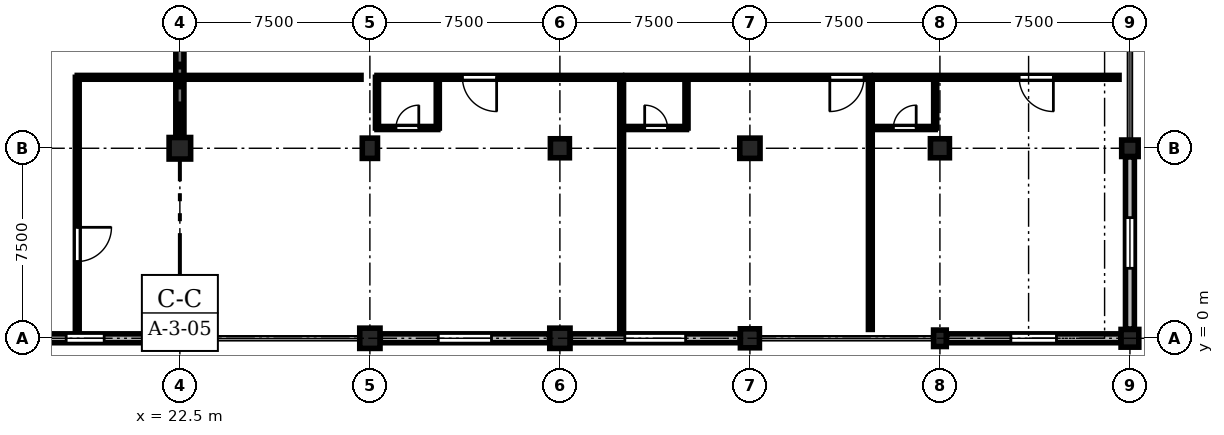
"""IFC4 building model, lengths in metres.
Left out: names, types, materials, properties, quantities, classifications, styles, units other than length and angle.
Written with IfcOpenShell. Run it as: python <this file> out.ifc"""

import sys

from ifc_helpers import new_model, si_unit, direction, frame, frame_2d, origin, origin_2d, place, context, subcontext, project, spatial, rectangle, circle, extrude, element, fill, save


model = new_model("IFC4")
c1 = context("Model", 3, precision=1e-05, world=origin(), true_north=direction((0.0, 1.0)))
c2 = subcontext(c1, "Body", "Model", "MODEL_VIEW")
j1 = project(units=[si_unit("LENGTHUNIT", "METRE"), si_unit("PLANEANGLEUNIT", "RADIAN")], contexts=[c1])
p1 = place(None, origin())
s1 = spatial("IfcSite", under=j1, at=p1, CompositionType="ELEMENT")
p2 = place(p1, origin())
s2 = spatial("IfcBuilding", under=s1, at=p2, CompositionType="ELEMENT")
p3 = place(p2, frame((0.0, 0.0, 4.8)))
s3 = spatial("IfcBuildingStorey", under=s2, at=p3, CompositionType="ELEMENT", Elevation=4.8)
p4 = place(p3, frame((22.5, 0.0, 0.0), z_axis=(0.0, 0.0, 1.0), x_axis=(1.0, 0.0, 0.0)))
e1 = element("IfcColumn", 1, at=p4, inside=s3, PredefinedType="COLUMN", context=c2, shape_type="SweptSolid", body=[
    extrude(circle(Radius=0.375, at=origin_2d()), origin(), (0.0, 0.0, 1.0), 4.5),
])
p5 = place(p3, frame((22.5, 7.5, 0.0), z_axis=(0.0, 0.0, 1.0), x_axis=(1.0, 0.0, 0.0)))
e2 = element("IfcColumn", 2, at=p5, inside=s3, PredefinedType="COLUMN", context=c2, shape_type="SweptSolid", body=[
    extrude(rectangle(XDim=0.85, YDim=0.85, at=origin_2d()), origin(), (0.0, 0.0, 1.0), 4.5),
])
p6 = place(p3, frame((30.0, 0.0, 0.0), z_axis=(0.0, 0.0, 1.0), x_axis=(1.0, 0.0, 0.0)))
e3 = element("IfcColumn", 3, at=p6, inside=s3, PredefinedType="COLUMN", context=c2, shape_type="SweptSolid", body=[
    extrude(rectangle(XDim=0.8, YDim=0.8, at=origin_2d()), origin(), (0.0, 0.0, 1.0), 4.5),
])
p7 = place(p3, frame((30.0, 7.5, 0.0), z_axis=(0.0, 0.0, 1.0), x_axis=(1.0, 0.0, 0.0)))
e4 = element("IfcColumn", 4, at=p7, inside=s3, PredefinedType="COLUMN", context=c2, shape_type="SweptSolid", body=[
    extrude(rectangle(XDim=0.6, YDim=0.8, at=origin_2d()), origin(), (0.0, 0.0, 1.0), 4.5),
])
p8 = place(p3, frame((37.5, 0.0, 0.0), z_axis=(0.0, 0.0, 1.0), x_axis=(1.0, 0.0, 0.0)))
e5 = element("IfcColumn", 5, at=p8, inside=s3, PredefinedType="COLUMN", context=c2, shape_type="SweptSolid", body=[
    extrude(rectangle(XDim=0.8, YDim=0.8, at=origin_2d()), origin(), (0.0, 0.0, 1.0), 4.5),
])
for number, where, z_axis, x_axis in (
    (6, (37.5, 7.5, 0.0), (0.0, 0.0, 1.0), (1.0, 0.0, 0.0)),
    (7, (45.0, 0.0, 0.0), (0.0, 0.0, 1.0), (1.0, 0.0, 0.0)),
):
    element("IfcColumn", number, at=place(p3, frame(where, z_axis=z_axis, x_axis=x_axis)), inside=s3, PredefinedType="COLUMN", context=c2, shape_type="SweptSolid", body=[
        extrude(circle(Radius=0.375, at=origin_2d()), origin(), (0.0, 0.0, 1.0), 4.5),
    ])
p9 = place(p3, frame((45.0, 7.5, 0.0), z_axis=(0.0, 0.0, 1.0), x_axis=(1.0, 0.0, 0.0)))
e8 = element("IfcColumn", 8, at=p9, inside=s3, PredefinedType="COLUMN", context=c2, shape_type="SweptSolid", body=[
    extrude(rectangle(XDim=0.8, YDim=0.8, at=origin_2d()), origin(), (0.0, 0.0, 1.0), 4.5),
])
p10 = place(p3, frame((52.5, 0.0, 0.0), z_axis=(0.0, 0.0, 1.0), x_axis=(1.0, 0.0, 0.0)))
e9 = element("IfcColumn", 9, at=p10, inside=s3, PredefinedType="COLUMN", context=c2, shape_type="SweptSolid", body=[
    extrude(rectangle(XDim=0.5, YDim=0.65, at=origin_2d()), origin(), (0.0, 0.0, 1.0), 4.5),
])
p11 = place(p3, frame((52.5, 7.5, 0.0), z_axis=(0.0, 0.0, 1.0), x_axis=(1.0, 0.0, 0.0)))
e10 = element("IfcColumn", 10, at=p11, inside=s3, PredefinedType="COLUMN", context=c2, shape_type="SweptSolid", body=[
    extrude(rectangle(XDim=0.75, YDim=0.75, at=origin_2d()), origin(), (0.0, 0.0, 1.0), 4.5),
])
p12 = place(p3, frame((60.0, 0.0, 0.0), z_axis=(0.0, 0.0, 1.0), x_axis=(1.0, 0.0, 0.0)))
e11 = element("IfcColumn", 11, at=p12, inside=s3, PredefinedType="COLUMN", context=c2, shape_type="SweptSolid", body=[
    extrude(rectangle(XDim=0.7, YDim=0.7, at=origin_2d()), origin(), (0.0, 0.0, 1.0), 4.5),
])
p13 = place(p3, frame((60.0, 7.5, 0.0), z_axis=(0.0, 0.0, 1.0), x_axis=(1.0, 0.0, 0.0)))
e12 = element("IfcColumn", 12, at=p13, inside=s3, PredefinedType="COLUMN", context=c2, shape_type="SweptSolid", body=[
    extrude(rectangle(XDim=0.65, YDim=0.65, at=origin_2d()), origin(), (0.0, 0.0, 1.0), 4.5),
])
p14 = place(p3, frame((22.5, 7.95, 0.0), z_axis=(0.0, 0.0, 1.0), x_axis=(0.0, 1.0, 0.0)))
e13 = element("IfcWall", 13, at=p14, inside=s3, PredefinedType="SHEAR", context=c2, shape_type="SweptSolid", body=[
    extrude(rectangle(XDim=6.6, YDim=0.32, at=frame_2d((3.3, 0.0))), origin(), (0.0, 0.0, 1.0), 3.63),
])
p15 = place(p3, frame((22.115, 0.0, 0.0), z_axis=(0.0, 0.0, 1.0), x_axis=(-1.0, 0.0, 0.0)))
e14 = element("IfcWall", 14, at=p15, inside=s3, PredefinedType="STANDARD", context=c2, shape_type="SweptSolid", body=[
    extrude(rectangle(XDim=6.705, YDim=0.35, at=frame_2d((3.353, 0.0))), origin(), (0.0, 0.0, 1.0), 3.63),
])
p16 = place(p15, frame((2.603, 0.0, 0.9)))
e15 = element("IfcOpeningElement", 15, at=p16, cuts=e14, PredefinedType="OPENING", context=c2, shape_type="SweptSolid", body=[
    extrude(rectangle(XDim=1.5, YDim=2.1, at=frame_2d((0.75, 1.05))), frame((0.0, 0.185, 0.0), z_axis=(0.0, -1.0, 0.0), x_axis=(1.0, 0.0, 0.0)), (0.0, 0.0, 1.0), 0.37),
])
p17 = place(p3, frame((37.09, 0.0, 0.0), z_axis=(0.0, 0.0, 1.0), x_axis=(-1.0, 0.0, 0.0)))
e16 = element("IfcWall", 16, at=p17, inside=s3, PredefinedType="STANDARD", context=c2, shape_type="SweptSolid", body=[
    extrude(rectangle(XDim=6.68, YDim=0.35, at=frame_2d((3.34, 0.0))), origin(), (0.0, 0.0, 1.0), 3.63),
])
p18 = place(p17, frame((2.29, 0.0, 0.9)))
e17 = element("IfcOpeningElement", 17, at=p18, cuts=e16, PredefinedType="OPENING", context=c2, shape_type="SweptSolid", body=[
    extrude(rectangle(XDim=2.1, YDim=2.1, at=frame_2d((1.05, 1.05))), frame((0.0, 0.185, 0.0), z_axis=(0.0, -1.0, 0.0), x_axis=(1.0, 0.0, 0.0)), (0.0, 0.0, 1.0), 0.37),
])
p19 = place(p3, frame((44.615, 0.0, 0.0), z_axis=(0.0, 0.0, 1.0), x_axis=(-1.0, 0.0, 0.0)))
e18 = element("IfcWall", 18, at=p19, inside=s3, PredefinedType="STANDARD", context=c2, shape_type="SweptSolid", body=[
    extrude(rectangle(XDim=6.705, YDim=0.35, at=frame_2d((3.353, 0.0))), origin(), (0.0, 0.0, 1.0), 3.63),
])
p20 = place(p19, frame((2.153, 0.0, 0.9)))
e19 = element("IfcOpeningElement", 19, at=p20, cuts=e18, PredefinedType="OPENING", context=c2, shape_type="SweptSolid", body=[
    extrude(rectangle(XDim=2.4, YDim=2.1, at=frame_2d((1.2, 1.05))), frame((0.0, 0.185, 0.0), z_axis=(0.0, -1.0, 0.0), x_axis=(1.0, 0.0, 0.0)), (0.0, 0.0, 1.0), 0.37),
])
p21 = place(p3, frame((59.64, 0.0, 0.0), z_axis=(0.0, 0.0, 1.0), x_axis=(-1.0, 0.0, 0.0)))
e20 = element("IfcWall", 20, at=p21, inside=s3, PredefinedType="STANDARD", context=c2, shape_type="SweptSolid", body=[
    extrude(rectangle(XDim=6.88, YDim=0.35, at=frame_2d((3.44, 0.0))), origin(), (0.0, 0.0, 1.0), 3.63),
])
p22 = place(p21, frame((2.54, 0.0, 0.9)))
e21 = element("IfcOpeningElement", 21, at=p22, cuts=e20, PredefinedType="OPENING", context=c2, shape_type="SweptSolid", body=[
    extrude(rectangle(XDim=1.8, YDim=1.95, at=frame_2d((0.9, 0.975))), frame((0.0, 0.185, 0.0), z_axis=(0.0, -1.0, 0.0), x_axis=(1.0, 0.0, 0.0)), (0.0, 0.0, 1.0), 0.37),
])
p23 = place(p3, frame((60.0, 7.165, 0.0), z_axis=(0.0, 0.0, 1.0), x_axis=(0.0, -1.0, 0.0)))
e22 = element("IfcWall", 22, at=p23, inside=s3, PredefinedType="STANDARD", context=c2, shape_type="SweptSolid", body=[
    extrude(rectangle(XDim=6.805, YDim=0.35, at=frame_2d((3.402, 0.0))), origin(), (0.0, 0.0, 1.0), 3.63),
])
p24 = place(p23, frame((2.403, 0.0, 0.9)))
e23 = element("IfcOpeningElement", 23, at=p24, cuts=e22, PredefinedType="OPENING", context=c2, shape_type="SweptSolid", body=[
    extrude(rectangle(XDim=2.0, YDim=1.95, at=frame_2d((1.0, 0.975))), frame((0.0, 0.185, 0.0), z_axis=(0.0, -1.0, 0.0), x_axis=(1.0, 0.0, 0.0)), (0.0, 0.0, 1.0), 0.37),
])
p25 = place(p3, frame((18.45, 10.3, 0.0), z_axis=(0.0, 0.0, 1.0), x_axis=(0.0, -1.0, 0.0)))
e24 = element("IfcWall", 24, at=p25, inside=s3, PredefinedType="PARTITIONING", context=c2, shape_type="SweptSolid", body=[
    extrude(rectangle(XDim=9.95, YDim=0.15, at=frame_2d((4.975, 0.0))), origin(), (0.0, 0.0, 1.0), 3.765),
])
p26 = place(p25, frame((5.92, 0.0, 0.0)))
e25 = element("IfcOpeningElement", 25, at=p26, cuts=e24, PredefinedType="OPENING", context=c2, shape_type="SweptSolid", body=[
    extrude(rectangle(XDim=1.35, YDim=2.25, at=frame_2d((0.675, 1.125))), frame((0.0, 0.085, 0.0), z_axis=(0.0, -1.0, 0.0), x_axis=(1.0, 0.0, 0.0)), (0.0, 0.0, 1.0), 0.17),
])
p27 = place(p3, frame((39.937, 10.3, 0.0), z_axis=(0.0, 0.0, 1.0), x_axis=(-1.0, 0.0, 0.0)))
e26 = element("IfcWall", 26, at=p27, inside=s3, PredefinedType="PARTITIONING", context=c2, shape_type="SweptSolid", body=[
    extrude(rectangle(XDim=9.657, YDim=0.15, at=frame_2d((4.828, 0.0))), origin(), (0.0, 0.0, 1.0), 4.165),
])
p28 = place(p27, frame((4.934, 0.0, 0.0)))
e27 = element("IfcOpeningElement", 27, at=p28, cuts=e26, PredefinedType="OPENING", context=c2, shape_type="SweptSolid", body=[
    extrude(rectangle(XDim=1.35, YDim=2.25, at=frame_2d((0.675, 1.125))), frame((0.0, 0.085, 0.0), z_axis=(0.0, -1.0, 0.0), x_axis=(1.0, 0.0, 0.0)), (0.0, 0.0, 1.0), 0.17),
])
p29 = place(p3, frame((30.28, 8.3, 0.0), z_axis=(0.0, 0.0, 1.0), x_axis=(1.0, 0.0, 0.0)))
e28 = element("IfcWall", 28, at=p29, inside=s3, PredefinedType="PARTITIONING", context=c2, shape_type="SweptSolid", body=[
    extrude(rectangle(XDim=2.4, YDim=0.12, at=frame_2d((1.2, 0.0))), origin(), (0.0, 0.0, 1.0), 4.165),
])
p30 = place(p29, frame((0.75, 0.0, 0.0)))
e29 = element("IfcOpeningElement", 29, at=p30, cuts=e28, PredefinedType="OPENING", context=c2, shape_type="SweptSolid", body=[
    extrude(rectangle(XDim=0.9, YDim=2.1, at=frame_2d((0.45, 1.05))), frame((0.0, 0.07, 0.0), z_axis=(0.0, -1.0, 0.0), x_axis=(1.0, 0.0, 0.0)), (0.0, 0.0, 1.0), 0.14),
])
p31 = place(p3, frame((32.68, 8.3, 0.0), z_axis=(0.0, 0.0, 1.0), x_axis=(0.0, 1.0, 0.0)))
e30 = element("IfcWall", 30, at=p31, inside=s3, PredefinedType="PARTITIONING", context=c2, shape_type="SweptSolid", body=[
    extrude(rectangle(XDim=2.0, YDim=0.12, at=frame_2d((1.0, 0.0))), origin(), (0.0, 0.0, 1.0), 4.165),
])
p32 = place(p3, frame((49.753, 10.3, 0.0), z_axis=(0.0, 0.0, 1.0), x_axis=(-1.0, 0.0, 0.0)))
e31 = element("IfcWall", 31, at=p32, inside=s3, PredefinedType="PARTITIONING", context=c2, shape_type="SweptSolid", body=[
    extrude(rectangle(XDim=9.657, YDim=0.15, at=frame_2d((4.828, 0.0))), origin(), (0.0, 0.0, 1.0), 4.165),
])
p33 = place(p32, frame((0.25, 0.0, 0.0)))
e32 = element("IfcOpeningElement", 32, at=p33, cuts=e31, PredefinedType="OPENING", context=c2, shape_type="SweptSolid", body=[
    extrude(rectangle(XDim=1.35, YDim=2.25, at=frame_2d((0.675, 1.125))), frame((0.0, 0.085, 0.0), z_axis=(0.0, -1.0, 0.0), x_axis=(1.0, 0.0, 0.0)), (0.0, 0.0, 1.0), 0.17),
])
p34 = place(p3, frame((40.097, 8.3, 0.0), z_axis=(0.0, 0.0, 1.0), x_axis=(1.0, 0.0, 0.0)))
e33 = element("IfcWall", 33, at=p34, inside=s3, PredefinedType="PARTITIONING", context=c2, shape_type="SweptSolid", body=[
    extrude(rectangle(XDim=2.4, YDim=0.12, at=frame_2d((1.2, 0.0))), origin(), (0.0, 0.0, 1.0), 4.165),
])
p35 = place(p34, frame((0.75, 0.0, 0.0)))
e34 = element("IfcOpeningElement", 34, at=p35, cuts=e33, PredefinedType="OPENING", context=c2, shape_type="SweptSolid", body=[
    extrude(rectangle(XDim=0.9, YDim=2.1, at=frame_2d((0.45, 1.05))), frame((0.0, 0.07, 0.0), z_axis=(0.0, -1.0, 0.0), x_axis=(1.0, 0.0, 0.0)), (0.0, 0.0, 1.0), 0.14),
])
p36 = place(p3, frame((42.497, 8.3, 0.0), z_axis=(0.0, 0.0, 1.0), x_axis=(0.0, 1.0, 0.0)))
e35 = element("IfcWall", 35, at=p36, inside=s3, PredefinedType="PARTITIONING", context=c2, shape_type="SweptSolid", body=[
    extrude(rectangle(XDim=2.0, YDim=0.12, at=frame_2d((1.0, 0.0))), origin(), (0.0, 0.0, 1.0), 4.165),
])
p37 = place(p3, frame((59.57, 10.3, 0.0), z_axis=(0.0, 0.0, 1.0), x_axis=(-1.0, 0.0, 0.0)))
e36 = element("IfcWall", 36, at=p37, inside=s3, PredefinedType="PARTITIONING", context=c2, shape_type="SweptSolid", body=[
    extrude(rectangle(XDim=9.657, YDim=0.15, at=frame_2d((4.828, 0.0))), origin(), (0.0, 0.0, 1.0), 4.165),
])
p38 = place(p37, frame((2.592, 0.0, 0.0)))
e37 = element("IfcOpeningElement", 37, at=p38, cuts=e36, PredefinedType="OPENING", context=c2, shape_type="SweptSolid", body=[
    extrude(rectangle(XDim=1.35, YDim=2.25, at=frame_2d((0.675, 1.125))), frame((0.0, 0.085, 0.0), z_axis=(0.0, -1.0, 0.0), x_axis=(1.0, 0.0, 0.0)), (0.0, 0.0, 1.0), 0.17),
])
p39 = place(p3, frame((49.913, 8.3, 0.0), z_axis=(0.0, 0.0, 1.0), x_axis=(1.0, 0.0, 0.0)))
e38 = element("IfcWall", 38, at=p39, inside=s3, PredefinedType="PARTITIONING", context=c2, shape_type="SweptSolid", body=[
    extrude(rectangle(XDim=2.4, YDim=0.12, at=frame_2d((1.2, 0.0))), origin(), (0.0, 0.0, 1.0), 4.165),
])
p40 = place(p39, frame((0.75, 0.0, 0.0)))
e39 = element("IfcOpeningElement", 39, at=p40, cuts=e38, PredefinedType="OPENING", context=c2, shape_type="SweptSolid", body=[
    extrude(rectangle(XDim=0.9, YDim=2.1, at=frame_2d((0.45, 1.05))), frame((0.0, 0.07, 0.0), z_axis=(0.0, -1.0, 0.0), x_axis=(1.0, 0.0, 0.0)), (0.0, 0.0, 1.0), 0.14),
])
p41 = place(p3, frame((52.313, 8.3, 0.0), z_axis=(0.0, 0.0, 1.0), x_axis=(0.0, 1.0, 0.0)))
e40 = element("IfcWall", 40, at=p41, inside=s3, PredefinedType="PARTITIONING", context=c2, shape_type="SweptSolid", body=[
    extrude(rectangle(XDim=2.0, YDim=0.12, at=frame_2d((1.0, 0.0))), origin(), (0.0, 0.0, 1.0), 3.565),
])
p42 = place(p3, frame((18.45, 10.3, 0.0), z_axis=(0.0, 0.0, 1.0), x_axis=(1.0, 0.0, 0.0)))
e41 = element("IfcWall", 41, at=p42, inside=s3, PredefinedType="PARTITIONING", context=c2, shape_type="SweptSolid", body=[
    extrude(rectangle(XDim=11.2, YDim=0.15, at=frame_2d((5.6, 0.0))), origin(), (0.0, 0.0, 1.0), 4.165),
])
for number, where, z_axis, x_axis in (
    (42, (39.937, 0.35, 0.0), (0.0, 0.0, 1.0), (0.0, 1.0, 0.0)),
    (43, (49.753, 0.35, 0.0), (0.0, 0.0, 1.0), (0.0, 1.0, 0.0)),
):
    element("IfcWall", number, at=place(p3, frame(where, z_axis=z_axis, x_axis=x_axis)), inside=s3, PredefinedType="PARTITIONING", context=c2, shape_type="SweptSolid", body=[
        extrude(rectangle(XDim=9.95, YDim=0.15, at=frame_2d((4.975, 0.0))), origin(), (0.0, 0.0, 1.0), 4.165),
    ])
p43 = place(p3, frame((30.28, 8.3, 0.0), z_axis=(0.0, 0.0, 1.0), x_axis=(0.0, 1.0, 0.0)))
e44 = element("IfcWall", 44, at=p43, inside=s3, PredefinedType="PARTITIONING", context=c2, shape_type="SweptSolid", body=[
    extrude(rectangle(XDim=2.0, YDim=0.12, at=frame_2d((1.0, 0.0))), origin(), (0.0, 0.0, 1.0), 3.565),
])
p44 = place(p16, origin())
e45 = element("IfcWindow", 45, at=p44, inside=s3, PartitioningType="SINGLE_PANEL", PredefinedType="WINDOW", context=c2, shape_type="SweptSolid", body=[
    extrude(rectangle(XDim=1.5, YDim=2.1, at=frame_2d((0.75, 1.05))), frame((0.0, 0.03, 0.0), z_axis=(0.0, -1.0, 0.0), x_axis=(1.0, 0.0, 0.0)), (0.0, 0.0, 1.0), 0.06),
])
fill(e15, e45)
p45 = place(p18, origin())
e46 = element("IfcWindow", 46, at=p45, inside=s3, PartitioningType="SINGLE_PANEL", PredefinedType="WINDOW", context=c2, shape_type="SweptSolid", body=[
    extrude(rectangle(XDim=2.1, YDim=2.1, at=frame_2d((1.05, 1.05))), frame((0.0, 0.03, 0.0), z_axis=(0.0, -1.0, 0.0), x_axis=(1.0, 0.0, 0.0)), (0.0, 0.0, 1.0), 0.06),
])
fill(e17, e46)
p46 = place(p20, origin())
e47 = element("IfcWindow", 47, at=p46, inside=s3, PartitioningType="SINGLE_PANEL", PredefinedType="WINDOW", context=c2, shape_type="SweptSolid", body=[
    extrude(rectangle(XDim=2.4, YDim=2.1, at=frame_2d((1.2, 1.05))), frame((0.0, 0.03, 0.0), z_axis=(0.0, -1.0, 0.0), x_axis=(1.0, 0.0, 0.0)), (0.0, 0.0, 1.0), 0.06),
])
fill(e19, e47)
p47 = place(p22, origin())
e48 = element("IfcWindow", 48, at=p47, inside=s3, PartitioningType="SINGLE_PANEL", PredefinedType="WINDOW", context=c2, shape_type="SweptSolid", body=[
    extrude(rectangle(XDim=1.8, YDim=1.95, at=frame_2d((0.9, 0.975))), frame((0.0, 0.03, 0.0), z_axis=(0.0, -1.0, 0.0), x_axis=(1.0, 0.0, 0.0)), (0.0, 0.0, 1.0), 0.06),
])
fill(e21, e48)
p48 = place(p24, origin())
e49 = element("IfcWindow", 49, at=p48, inside=s3, PartitioningType="SINGLE_PANEL", PredefinedType="WINDOW", context=c2, shape_type="SweptSolid", body=[
    extrude(rectangle(XDim=2.0, YDim=1.95, at=frame_2d((1.0, 0.975))), frame((0.0, 0.03, 0.0), z_axis=(0.0, -1.0, 0.0), x_axis=(1.0, 0.0, 0.0)), (0.0, 0.0, 1.0), 0.06),
])
fill(e23, e49)
p49 = place(p26, origin())
e50 = element("IfcDoor", 50, at=p49, inside=s3, OperationType="SINGLE_SWING_LEFT", PredefinedType="DOOR", context=c2, shape_type="SweptSolid", body=[
    extrude(rectangle(XDim=1.35, YDim=2.25, at=frame_2d((0.675, 1.125))), frame((0.0, 0.025, 0.0), z_axis=(0.0, -1.0, 0.0), x_axis=(1.0, 0.0, 0.0)), (0.0, 0.0, 1.0), 0.05),
])
fill(e25, e50)
p50 = place(p28, origin())
e51 = element("IfcDoor", 51, at=p50, inside=s3, OperationType="SINGLE_SWING_LEFT", PredefinedType="DOOR", context=c2, shape_type="SweptSolid", body=[
    extrude(rectangle(XDim=1.35, YDim=2.25, at=frame_2d((0.675, 1.125))), frame((0.0, 0.025, 0.0), z_axis=(0.0, -1.0, 0.0), x_axis=(1.0, 0.0, 0.0)), (0.0, 0.0, 1.0), 0.05),
])
fill(e27, e51)
p51 = place(p30, origin())
e52 = element("IfcDoor", 52, at=p51, inside=s3, OperationType="SINGLE_SWING_RIGHT", PredefinedType="DOOR", context=c2, shape_type="SweptSolid", body=[
    extrude(rectangle(XDim=0.9, YDim=2.1, at=frame_2d((0.45, 1.05))), frame((0.0, 0.025, 0.0), z_axis=(0.0, -1.0, 0.0), x_axis=(1.0, 0.0, 0.0)), (0.0, 0.0, 1.0), 0.05),
])
fill(e29, e52)
p52 = place(p33, origin())
e53 = element("IfcDoor", 53, at=p52, inside=s3, OperationType="SINGLE_SWING_RIGHT", PredefinedType="DOOR", context=c2, shape_type="SweptSolid", body=[
    extrude(rectangle(XDim=1.35, YDim=2.25, at=frame_2d((0.675, 1.125))), frame((0.0, 0.025, 0.0), z_axis=(0.0, -1.0, 0.0), x_axis=(1.0, 0.0, 0.0)), (0.0, 0.0, 1.0), 0.05),
])
fill(e32, e53)
p53 = place(p35, origin())
e54 = element("IfcDoor", 54, at=p53, inside=s3, OperationType="SINGLE_SWING_LEFT", PredefinedType="DOOR", context=c2, shape_type="SweptSolid", body=[
    extrude(rectangle(XDim=0.9, YDim=2.1, at=frame_2d((0.45, 1.05))), frame((0.0, 0.025, 0.0), z_axis=(0.0, -1.0, 0.0), x_axis=(1.0, 0.0, 0.0)), (0.0, 0.0, 1.0), 0.05),
])
fill(e34, e54)
p54 = place(p38, origin())
e55 = element("IfcDoor", 55, at=p54, inside=s3, OperationType="SINGLE_SWING_LEFT", PredefinedType="DOOR", context=c2, shape_type="SweptSolid", body=[
    extrude(rectangle(XDim=1.35, YDim=2.25, at=frame_2d((0.675, 1.125))), frame((0.0, 0.025, 0.0), z_axis=(0.0, -1.0, 0.0), x_axis=(1.0, 0.0, 0.0)), (0.0, 0.0, 1.0), 0.05),
])
fill(e37, e55)
p55 = place(p40, origin())
e56 = element("IfcDoor", 56, at=p55, inside=s3, OperationType="SINGLE_SWING_RIGHT", PredefinedType="DOOR", context=c2, shape_type="SweptSolid", body=[
    extrude(rectangle(XDim=0.9, YDim=2.1, at=frame_2d((0.45, 1.05))), frame((0.0, 0.025, 0.0), z_axis=(0.0, -1.0, 0.0), x_axis=(1.0, 0.0, 0.0)), (0.0, 0.0, 1.0), 0.05),
])
fill(e39, e56)
save(model, sys.argv[1])
